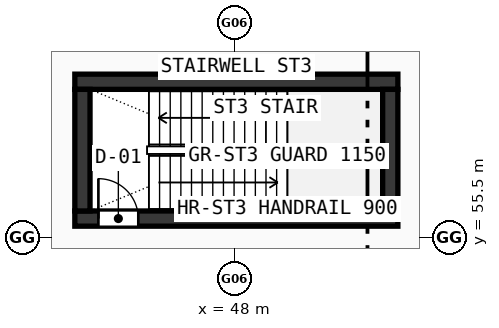
"""IFC4 building model, lengths in metres.
Left out: names, types, materials, properties, quantities, classifications, styles, units other than length and angle.
Written with IfcOpenShell. Run it as: python <this file> out.ifc"""

import sys

from ifc_helpers import new_model, si_unit, direction, frame, frame_2d, origin, origin_with_axes, place, context, subcontext, project, spatial, rectangle, extrude, source, transform, mapped, element, fill, save


model = new_model("IFC4")
c1 = context("Model", 3, precision=1e-05, world=origin(), true_north=direction((0.0, 1.0)))
c2 = subcontext(c1, "Body", "Model", "MODEL_VIEW")
j1 = project(units=[si_unit("LENGTHUNIT", "METRE"), si_unit("PLANEANGLEUNIT", "RADIAN")], contexts=[c1])
p1 = place(None, origin())
s1 = spatial("IfcSite", under=j1, at=p1, CompositionType="ELEMENT")
p2 = place(p1, origin())
s2 = spatial("IfcBuilding", under=s1, at=p2, CompositionType="ELEMENT")
p3 = place(p2, origin())
s3 = spatial("IfcBuildingStorey", under=s2, at=p3, CompositionType="ELEMENT", Elevation=0.0)
p4 = place(p3, frame((43.8, 59.6, 0.0), z_axis=(0.0, 0.0, 1.0), x_axis=(1.0, 0.0, 0.0)))
e1 = element("IfcWall", 1, at=p4, inside=s3, PredefinedType="SHEAR", context=c2, shape_type="SweptSolid", body=[
    extrude(rectangle(XDim=8.5, YDim=0.4, at=frame_2d((4.25, 0.0))), origin(), (0.0, 0.0, 1.0), 4.52),
])
p5 = place(p3, frame((43.8, 56.0, 0.0), z_axis=(0.0, 0.0, 1.0), x_axis=(1.0, 0.0, 0.0)))
e2 = element("IfcWall", 2, at=p5, inside=s3, PredefinedType="SHEAR", context=c2, shape_type="SweptSolid", body=[
    extrude(rectangle(XDim=8.5, YDim=0.4, at=frame_2d((4.25, 0.0))), origin(), (0.0, 0.0, 1.0), 4.52),
])
p6 = place(p5, frame((0.62, 0.0, 0.0)))
e3 = element("IfcOpeningElement", 3, at=p6, cuts=e2, PredefinedType="OPENING", context=c2, shape_type="SweptSolid", body=[
    extrude(rectangle(XDim=1.05, YDim=2.1, at=frame_2d((0.525, 1.05))), frame((0.0, 0.21, 0.0), z_axis=(0.0, -1.0, 0.0), x_axis=(1.0, 0.0, 0.0)), (0.0, 0.0, 1.0), 0.42),
])
for number, where, z_axis, x_axis in (
    (4, (44.0, 56.2, 0.0), (0.0, 0.0, 1.0), (0.0, 1.0, 0.0)),
    (5, (52.1, 56.2, 0.0), (0.0, 0.0, 1.0), (0.0, 1.0, 0.0)),
):
    element("IfcWall", number, at=place(p3, frame(where, z_axis=z_axis, x_axis=x_axis)), inside=s3, PredefinedType="SHEAR", context=c2, shape_type="SweptSolid", body=[
        extrude(rectangle(XDim=3.2, YDim=0.4, at=frame_2d((1.6, 0.0))), origin(), (0.0, 0.0, 1.0), 4.52),
    ])
m1 = source(origin(), c2, "Body", "SweptSolid", [
    extrude(rectangle(XDim=1.05, YDim=2.1, at=frame_2d((0.525, 1.05))), frame((0.0, 0.025, 0.0), z_axis=(0.0, -1.0, 0.0), x_axis=(1.0, 0.0, 0.0)), (0.0, 0.0, 1.0), 0.05),
])
p7 = place(p6, origin_with_axes())
e6 = element("IfcDoor", 6, at=p7, inside=s3, OperationType="SINGLE_SWING_LEFT", PredefinedType="DOOR", context=c2, shape_type="MappedRepresentation", body=[
    mapped(m1, transform((0.0, 0.0, 0.0), scale=1.0)),
])
fill(e3, e6)
save(model, sys.argv[1])
